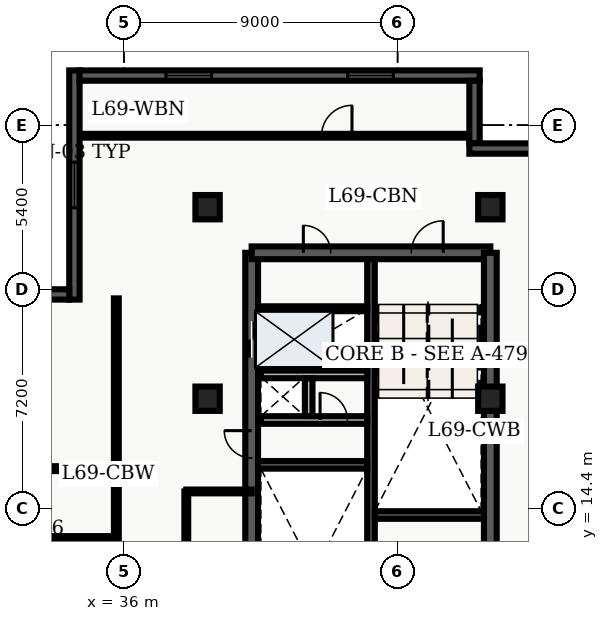
"""IFC4 building model, lengths in metres.
Left out: names, types, materials, properties, quantities, classifications, styles, units other than length and angle.
Written with IfcOpenShell. Run it as: python <this file> out.ifc"""

import sys

from ifc_helpers import new_model, entity, si_unit, converted_unit, direction, frame, origin_with_axes, origin_2d_with_axis, place, context, subcontext, project, spatial, polyline, rectangle, outline, extrude, element, fill, save


model = new_model("IFC4")
c1 = context("Model", 3, precision=1e-05, world=origin_with_axes(), true_north=direction((0.0, 1.0)))
c2 = subcontext(c1, "Body", "Model", "MODEL_VIEW")
j1 = project(units=[si_unit("LENGTHUNIT", "METRE"), converted_unit("PLANEANGLEUNIT", "DEGREE", entity("IfcPlaneAngleMeasure", 0.017), si_unit("PLANEANGLEUNIT", "RADIAN"), dimensions=[0, 0, 0, 0, 0, 0, 0])], contexts=[c1])
p1 = place(None, origin_with_axes())
s1 = spatial("IfcSite", under=j1, at=p1, CompositionType="ELEMENT")
p2 = place(p1, origin_with_axes())
s2 = spatial("IfcBuilding", under=s1, at=p2, CompositionType="ELEMENT")
p3 = place(p2, frame((0.0, 0.0, 280.2), z_axis=(0.0, 0.0, 1.0), x_axis=(1.0, 0.0, 0.0)))
s3 = spatial("IfcBuildingStorey", under=s2, at=p3, CompositionType="ELEMENT", Elevation=280.2)
p4 = place(p3, frame((40.2, 7.2, 0.0), z_axis=(0.0, 0.0, 1.0), x_axis=(0.0, 1.0, 0.0)))
e1 = element("IfcWall", 1, at=p4, inside=s3, PredefinedType="SHEAR", context=c2, shape_type="SweptSolid", body=[
    extrude(outline(polyline([(0.0, -0.21), (15.6, -0.21), (15.6, 0.21), (0.0, 0.21), (0.0, -0.21)])), origin_with_axes(), (0.0, 0.0, 1.0), 3.66),
])
p5 = place(p4, frame((12.75, 0.0, 0.0), z_axis=(0.0, 0.0, 1.0), x_axis=(1.0, 0.0, 0.0)))
e2 = element("IfcOpeningElement", 2, at=p5, cuts=e1, PredefinedType="OPENING", context=c2, shape_type="SweptSolid", body=[
    extrude(rectangle(XDim=1.2, YDim=0.44, at=origin_2d_with_axis()), origin_with_axes(), (0.0, 0.0, 1.0), 2.15),
])
p6 = place(p4, frame((9.3, 0.0, 0.0), z_axis=(0.0, 0.0, 1.0), x_axis=(1.0, 0.0, 0.0)))
e3 = element("IfcOpeningElement", 3, at=p6, cuts=e1, PredefinedType="OPENING", context=c2, shape_type="SweptSolid", body=[
    extrude(rectangle(XDim=0.9, YDim=0.44, at=origin_2d_with_axis()), origin_with_axes(), (0.0, 0.0, 1.0), 2.15),
])
p7 = place(p3, frame((40.2, 22.8, 0.0), z_axis=(0.0, 0.0, 1.0), x_axis=(1.0, 0.0, 0.0)))
e4 = element("IfcWall", 4, at=p7, inside=s3, PredefinedType="SHEAR", context=c2, shape_type="SweptSolid", body=[
    extrude(outline(polyline([(0.0, -0.21), (7.85, -0.21), (7.85, 0.21), (0.0, 0.21), (0.0, -0.21)])), origin_with_axes(), (0.0, 0.0, 1.0), 3.66),
])
p8 = place(p7, frame((5.775, 0.0, 0.0), z_axis=(0.0, 0.0, 1.0), x_axis=(1.0, 0.0, 0.0)))
e5 = element("IfcOpeningElement", 5, at=p8, cuts=e4, PredefinedType="OPENING", context=c2, shape_type="SweptSolid", body=[
    extrude(rectangle(XDim=1.05, YDim=0.44, at=origin_2d_with_axis()), origin_with_axes(), (0.0, 0.0, 1.0), 2.15),
])
p9 = place(p7, frame((2.15, 0.0, 0.0), z_axis=(0.0, 0.0, 1.0), x_axis=(1.0, 0.0, 0.0)))
e6 = element("IfcOpeningElement", 6, at=p9, cuts=e4, PredefinedType="OPENING", context=c2, shape_type="SweptSolid", body=[
    extrude(rectangle(XDim=0.9, YDim=0.44, at=origin_2d_with_axis()), origin_with_axes(), (0.0, 0.0, 1.0), 2.15),
])
p10 = place(p3, frame((48.05, 7.2, 0.0), z_axis=(0.0, 0.0, 1.0), x_axis=(0.0, 1.0, 0.0)))
e7 = element("IfcWall", 7, at=p10, inside=s3, PredefinedType="SHEAR", context=c2, shape_type="SweptSolid", body=[
    extrude(outline(polyline([(0.0, -0.21), (15.6, -0.21), (15.6, 0.21), (0.0, 0.21), (0.0, -0.21)])), origin_with_axes(), (0.0, 0.0, 1.0), 3.66),
])
p11 = place(p10, frame((1.375, 0.0, 0.0), z_axis=(0.0, 0.0, 1.0), x_axis=(1.0, 0.0, 0.0)))
e8 = element("IfcOpeningElement", 8, at=p11, cuts=e7, PredefinedType="OPENING", context=c2, shape_type="SweptSolid", body=[
    extrude(rectangle(XDim=1.05, YDim=0.44, at=origin_2d_with_axis()), origin_with_axes(), (0.0, 0.0, 1.0), 2.15),
])
p12 = place(p10, frame((5.125, 0.0, 0.0), z_axis=(0.0, 0.0, 1.0), x_axis=(1.0, 0.0, 0.0)))
e9 = element("IfcOpeningElement", 9, at=p12, cuts=e7, PredefinedType="OPENING", context=c2, shape_type="SweptSolid", body=[
    extrude(rectangle(XDim=0.95, YDim=0.44, at=origin_2d_with_axis()), origin_with_axes(), (0.0, 0.0, 1.0), 2.15),
])
p13 = place(p3, frame((44.125, 7.41, 0.0), z_axis=(0.0, 0.0, 1.0), x_axis=(0.0, 1.0, 0.0)))
e10 = element("IfcWall", 10, at=p13, inside=s3, PredefinedType="SHEAR", context=c2, shape_type="SweptSolid", body=[
    extrude(outline(polyline([(0.0, -0.125), (15.18, -0.125), (15.18, 0.125), (0.0, 0.125), (0.0, -0.125)])), origin_with_axes(), (0.0, 0.0, 1.0), 3.66),
])
for number, where, z_axis, x_axis in (
    (11, (40.41, 15.825, 0.0), (0.0, 0.0, 1.0), (1.0, 0.0, 0.0)),
    (12, (44.25, 14.175, 0.0), (0.0, 0.0, 1.0), (1.0, 0.0, 0.0)),
):
    element("IfcWall", number, at=place(p3, frame(where, z_axis=z_axis, x_axis=x_axis)), inside=s3, PredefinedType="SHEAR", context=c2, shape_type="SweptSolid", body=[
        extrude(outline(polyline([(0.0, -0.125), (3.59, -0.125), (3.59, 0.125), (0.0, 0.125), (0.0, -0.125)])), origin_with_axes(), (0.0, 0.0, 1.0), 3.66),
    ])
p14 = place(p3, frame((40.5, 17.3, 0.0), z_axis=(0.0, 0.0, 1.0), x_axis=(1.0, 0.0, 0.0)))
e13 = element("IfcWall", 13, at=p14, inside=s3, PredefinedType="SOLIDWALL", context=c2, shape_type="SweptSolid", body=[
    extrude(outline(polyline([(0.0, -0.125), (3.5, -0.125), (3.5, 0.125), (0.0, 0.125), (0.0, -0.125)])), origin_with_axes(), (0.0, 0.0, 1.0), 2.7),
])
p15 = place(p14, frame((2.4, 0.0, 0.0), z_axis=(0.0, 0.0, 1.0), x_axis=(1.0, 0.0, 0.0)))
e14 = element("IfcOpeningElement", 14, at=p15, cuts=e13, PredefinedType="OPENING", context=c2, shape_type="SweptSolid", body=[
    extrude(rectangle(XDim=0.9, YDim=0.27, at=origin_2d_with_axis()), origin_with_axes(), (0.0, 0.0, 1.0), 2.15),
])
p16 = place(p3, frame((40.5, 18.8, 0.0), z_axis=(0.0, 0.0, 1.0), x_axis=(1.0, 0.0, 0.0)))
e15 = element("IfcWall", 15, at=p16, inside=s3, PredefinedType="SOLIDWALL", context=c2, shape_type="SweptSolid", body=[
    extrude(outline(polyline([(0.0, -0.125), (3.5, -0.125), (3.5, 0.125), (0.0, 0.125), (0.0, -0.125)])), origin_with_axes(), (0.0, 0.0, 1.0), 2.7),
])
p17 = place(p3, frame((42.075, 17.43, 0.0), z_axis=(0.0, 0.0, 1.0), x_axis=(0.0, 1.0, 0.0)))
e16 = element("IfcWall", 16, at=p17, inside=s3, PredefinedType="SOLIDWALL", context=c2, shape_type="SweptSolid", body=[
    extrude(outline(polyline([(0.0, -0.125), (1.24, -0.125), (1.24, 0.125), (0.0, 0.125), (0.0, -0.125)])), origin_with_axes(), (0.0, 0.0, 1.0), 2.7),
])
for number, where, z_axis, x_axis in (
    (17, (38.75, 18.0, 0.0), (0.0, 0.0, 1.0), (1.0, 0.0, 0.0)),
    (18, (38.75, 24.3, 0.0), (0.0, 0.0, 1.0), (1.0, 0.0, 0.0)),
    (19, (48.05, 18.0, 0.0), (0.0, 0.0, 1.0), (1.0, 0.0, 0.0)),
    (20, (48.05, 24.3, 0.0), (0.0, 0.0, 1.0), (1.0, 0.0, 0.0)),
):
    element("IfcColumn", number, at=place(p3, frame(where, z_axis=z_axis, x_axis=x_axis)), inside=s3, PredefinedType="COLUMN", context=c2, shape_type="SweptSolid", body=[
        extrude(rectangle(XDim=0.8, YDim=0.8, at=origin_2d_with_axis()), origin_with_axes(), (0.0, 0.0, 1.0), 3.9),
    ])
p18 = place(p3, frame((40.5, 20.96, 0.0), z_axis=(0.0, 0.0, 1.0), x_axis=(1.0, 0.0, 0.0)))
e21 = element("IfcWall", 21, at=p18, inside=s3, PredefinedType="PARTITIONING", context=c2, shape_type="SweptSolid", body=[
    extrude(outline(polyline([(0.0, -0.08), (3.5, -0.08), (3.5, 0.08), (0.0, 0.08), (0.0, -0.08)])), origin_with_axes(), (0.0, 0.0, 1.0), 2.7),
])
p19 = place(p3, frame((20.3, 13.4, 0.0), z_axis=(0.0, 0.0, 1.0), x_axis=(1.0, 0.0, 0.0)))
e22 = element("IfcWall", 22, at=p19, inside=s3, PredefinedType="PARTITIONING", context=c2, shape_type="SweptSolid", body=[
    extrude(outline(polyline([(0.0, -0.08), (15.45, -0.08), (15.45, 0.08), (0.0, 0.08), (0.0, -0.08)])), origin_with_axes(), (0.0, 0.0, 1.0), 2.7),
])
p20 = place(p19, frame((2.304, 0.0, 0.0), z_axis=(0.0, 0.0, 1.0), x_axis=(1.0, 0.0, 0.0)))
e23 = element("IfcOpeningElement", 23, at=p20, cuts=e22, PredefinedType="OPENING", context=c2, shape_type="SweptSolid", body=[
    extrude(rectangle(XDim=1.0, YDim=0.18, at=origin_2d_with_axis()), origin_with_axes(), (0.0, 0.0, 1.0), 2.15),
])
p21 = place(p19, frame((6.866, 0.0, 0.0), z_axis=(0.0, 0.0, 1.0), x_axis=(1.0, 0.0, 0.0)))
e24 = element("IfcOpeningElement", 24, at=p21, cuts=e22, PredefinedType="OPENING", context=c2, shape_type="SweptSolid", body=[
    extrude(rectangle(XDim=1.0, YDim=0.18, at=origin_2d_with_axis()), origin_with_axes(), (0.0, 0.0, 1.0), 2.15),
])
p22 = place(p19, frame((12.337, 0.0, 0.0), z_axis=(0.0, 0.0, 1.0), x_axis=(1.0, 0.0, 0.0)))
e25 = element("IfcOpeningElement", 25, at=p22, cuts=e22, PredefinedType="OPENING", context=c2, shape_type="SweptSolid", body=[
    extrude(rectangle(XDim=1.2, YDim=0.18, at=origin_2d_with_axis()), origin_with_axes(), (0.0, 0.0, 1.0), 2.2),
])
p23 = place(p3, frame((20.3, 15.7, 0.0), z_axis=(0.0, 0.0, 1.0), x_axis=(1.0, 0.0, 0.0)))
e26 = element("IfcWall", 26, at=p23, inside=s3, PredefinedType="PARTITIONING", context=c2, shape_type="SweptSolid", body=[
    extrude(outline(polyline([(0.0, -0.08), (15.45, -0.08), (15.45, 0.08), (0.0, 0.08), (0.0, -0.08)])), origin_with_axes(), (0.0, 0.0, 1.0), 2.7),
])
p24 = place(p23, frame((7.775, 0.0, 0.0), z_axis=(0.0, 0.0, 1.0), x_axis=(1.0, 0.0, 0.0)))
e27 = element("IfcOpeningElement", 27, at=p24, cuts=e26, PredefinedType="OPENING", context=c2, shape_type="SweptSolid", body=[
    extrude(rectangle(XDim=1.0, YDim=0.18, at=origin_2d_with_axis()), origin_with_axes(), (0.0, 0.0, 1.0), 2.15),
])
p25 = place(p3, frame((35.75, 4.35, 0.0), z_axis=(0.0, 0.0, 1.0), x_axis=(0.0, 1.0, 0.0)))
e28 = element("IfcWall", 28, at=p25, inside=s3, PredefinedType="PARTITIONING", context=c2, shape_type="SweptSolid", body=[
    extrude(outline(polyline([(0.0, -0.08), (16.95, -0.08), (16.95, 0.08), (0.0, 0.08), (0.0, -0.08)])), origin_with_axes(), (0.0, 0.0, 1.0), 2.7),
])
p26 = place(p3, frame((34.535, 26.65, 0.0), z_axis=(0.0, 0.0, 1.0), x_axis=(1.0, 0.0, 0.0)))
e29 = element("IfcWall", 29, at=p26, inside=s3, PredefinedType="PARTITIONING", context=c2, shape_type="SweptSolid", body=[
    extrude(outline(polyline([(0.0, -0.062), (12.995, -0.062), (12.995, 0.062), (0.0, 0.062), (0.0, -0.062)])), origin_with_axes(), (0.0, 0.0, 1.0), 2.7),
])
p27 = place(p26, frame((8.465, 0.0, 0.0), z_axis=(0.0, 0.0, 1.0), x_axis=(1.0, 0.0, 0.0)))
e30 = element("IfcOpeningElement", 30, at=p27, cuts=e29, PredefinedType="OPENING", context=c2, shape_type="SweptSolid", body=[
    extrude(rectangle(XDim=1.0, YDim=0.145, at=origin_2d_with_axis()), origin_with_axes(), (0.0, 0.0, 1.0), 2.15),
])
p28 = place(p3, frame((38.05, 14.95, 0.0), z_axis=(0.0, 0.0, 1.0), x_axis=(1.0, 0.0, 0.0)))
e31 = element("IfcWall", 31, at=p28, inside=s3, PredefinedType="PARTITIONING", context=c2, shape_type="SweptSolid", body=[
    extrude(outline(polyline([(0.0, -0.062), (2.15, -0.062), (2.15, 0.062), (0.0, 0.062), (0.0, -0.062)])), origin_with_axes(), (0.0, 0.0, 1.0), 2.7),
])
p29 = place(p3, frame((38.05, 7.0, 0.0), z_axis=(0.0, 0.0, 1.0), x_axis=(0.0, 1.0, 0.0)))
e32 = element("IfcWall", 32, at=p29, inside=s3, PredefinedType="PARTITIONING", context=c2, shape_type="SweptSolid", body=[
    extrude(outline(polyline([(0.0, -0.062), (7.95, -0.062), (7.95, 0.062), (0.0, 0.062), (0.0, -0.062)])), origin_with_axes(), (0.0, 0.0, 1.0), 2.7),
])
p30 = place(p29, frame((5.65, 0.0, 0.0), z_axis=(0.0, 0.0, 1.0), x_axis=(1.0, 0.0, 0.0)))
e33 = element("IfcOpeningElement", 33, at=p30, cuts=e32, PredefinedType="OPENING", context=c2, shape_type="SweptSolid", body=[
    extrude(rectangle(XDim=0.9, YDim=0.145, at=origin_2d_with_axis()), origin_with_axes(), (0.0, 0.0, 1.0), 2.15),
])
p31 = place(p3, frame((34.37, 21.26, 0.0), z_axis=(0.0, 0.0, 1.0), x_axis=(0.0, 1.0, 0.0)))
e34 = element("IfcWall", 34, at=p31, inside=s3, PredefinedType="SOLIDWALL", context=c2, shape_type="SweptSolid", body=[
    extrude(outline(polyline([(0.0, -0.17), (7.54, -0.17), (7.54, 0.17), (0.0, 0.17), (0.0, -0.17)])), origin_with_axes(), (0.0, 0.0, 1.0), 3.66),
])
p32 = place(p31, frame((3.77, 0.0, 0.45), z_axis=(0.0, 0.0, 1.0), x_axis=(1.0, 0.0, 0.0)))
e35 = element("IfcOpeningElement", 35, at=p32, cuts=e34, PredefinedType="OPENING", context=c2, shape_type="SweptSolid", body=[
    extrude(rectangle(XDim=1.5, YDim=0.36, at=origin_2d_with_axis()), origin_with_axes(), (0.0, 0.0, 1.0), 2.1),
])
p33 = place(p3, frame((34.54, 28.63, 0.0), z_axis=(0.0, 0.0, 1.0), x_axis=(1.0, 0.0, 0.0)))
e36 = element("IfcWall", 36, at=p33, inside=s3, PredefinedType="SOLIDWALL", context=c2, shape_type="SweptSolid", body=[
    extrude(outline(polyline([(0.0, -0.17), (13.16, -0.17), (13.16, 0.17), (0.0, 0.17), (0.0, -0.17)])), origin_with_axes(), (0.0, 0.0, 1.0), 3.66),
])
p34 = place(p33, frame((3.59, 0.0, 0.45), z_axis=(0.0, 0.0, 1.0), x_axis=(1.0, 0.0, 0.0)))
e37 = element("IfcOpeningElement", 37, at=p34, cuts=e36, PredefinedType="OPENING", context=c2, shape_type="SweptSolid", body=[
    extrude(rectangle(XDim=1.5, YDim=0.36, at=origin_2d_with_axis()), origin_with_axes(), (0.0, 0.0, 1.0), 2.1),
])
p35 = place(p33, frame((9.57, 0.0, 0.45), z_axis=(0.0, 0.0, 1.0), x_axis=(1.0, 0.0, 0.0)))
e38 = element("IfcOpeningElement", 38, at=p35, cuts=e36, PredefinedType="OPENING", context=c2, shape_type="SweptSolid", body=[
    extrude(rectangle(XDim=1.5, YDim=0.36, at=origin_2d_with_axis()), origin_with_axes(), (0.0, 0.0, 1.0), 2.1),
])
p36 = place(p3, frame((47.53, 28.46, 0.0), z_axis=(0.0, 0.0, 1.0), x_axis=(0.0, -1.0, 0.0)))
e39 = element("IfcWall", 39, at=p36, inside=s3, PredefinedType="SOLIDWALL", context=c2, shape_type="SweptSolid", body=[
    extrude(outline(polyline([(0.0, -0.17), (2.06, -0.17), (2.06, 0.17), (0.0, 0.17), (0.0, -0.17)])), origin_with_axes(), (0.0, 0.0, 1.0), 3.66),
])
p37 = place(p3, frame((47.36, 26.23, 0.0), z_axis=(0.0, 0.0, 1.0), x_axis=(1.0, 0.0, 0.0)))
e40 = element("IfcWall", 40, at=p37, inside=s3, PredefinedType="SOLIDWALL", context=c2, shape_type="SweptSolid", body=[
    extrude(outline(polyline([(0.0, -0.17), (2.74, -0.17), (2.74, 0.17), (0.0, 0.17), (0.0, -0.17)])), origin_with_axes(), (0.0, 0.0, 1.0), 3.66),
])
p38 = place(p3, frame((32.06, 21.43, 0.0), z_axis=(0.0, 0.0, 1.0), x_axis=(1.0, 0.0, 0.0)))
e41 = element("IfcWall", 41, at=p38, inside=s3, PredefinedType="SOLIDWALL", context=c2, shape_type="SweptSolid", body=[
    extrude(outline(polyline([(0.0, -0.17), (2.14, -0.17), (2.14, 0.17), (0.0, 0.17), (0.0, -0.17)])), origin_with_axes(), (0.0, 0.0, 1.0), 3.66),
])
p39 = place(p4, frame((12.75, 0.0, 0.0), z_axis=(0.0, 0.0, 1.0), x_axis=(1.0, 0.0, 0.0)))
e42 = element("IfcDoor", 42, at=p39, inside=s3, OperationType="DOUBLE_DOOR_SLIDING", PredefinedType="DOOR", context=c2, shape_type="SweptSolid", body=[
    extrude(rectangle(XDim=1.2, YDim=0.09, at=origin_2d_with_axis()), origin_with_axes(), (0.0, 0.0, 1.0), 2.15),
])
fill(e2, e42)
p40 = place(p4, frame((9.3, 0.0, 0.0), z_axis=(0.0, 0.0, 1.0), x_axis=(1.0, 0.0, 0.0)))
e43 = element("IfcDoor", 43, at=p40, inside=s3, OperationType="SINGLE_SWING_RIGHT", PredefinedType="DOOR", context=c2, shape_type="SweptSolid", body=[
    extrude(rectangle(XDim=0.9, YDim=0.09, at=origin_2d_with_axis()), origin_with_axes(), (0.0, 0.0, 1.0), 2.15),
])
fill(e3, e43)
p41 = place(p14, frame((2.4, 0.0, 0.0), z_axis=(0.0, 0.0, 1.0), x_axis=(1.0, 0.0, 0.0)))
e44 = element("IfcDoor", 44, at=p41, inside=s3, OperationType="SINGLE_SWING_LEFT", PredefinedType="DOOR", context=c2, shape_type="SweptSolid", body=[
    extrude(rectangle(XDim=0.9, YDim=0.09, at=origin_2d_with_axis()), origin_with_axes(), (0.0, 0.0, 1.0), 2.15),
])
fill(e14, e44)
p42 = place(p7, frame((5.775, 0.0, 0.0), z_axis=(0.0, 0.0, 1.0), x_axis=(1.0, 0.0, 0.0)))
e45 = element("IfcDoor", 45, at=p42, inside=s3, OperationType="SINGLE_SWING_RIGHT", PredefinedType="DOOR", context=c2, shape_type="SweptSolid", body=[
    extrude(rectangle(XDim=1.05, YDim=0.09, at=origin_2d_with_axis()), origin_with_axes(), (0.0, 0.0, 1.0), 2.15),
])
fill(e5, e45)
p43 = place(p7, frame((2.15, 0.0, 0.0), z_axis=(0.0, 0.0, 1.0), x_axis=(1.0, 0.0, 0.0)))
e46 = element("IfcDoor", 46, at=p43, inside=s3, OperationType="SINGLE_SWING_LEFT", PredefinedType="DOOR", context=c2, shape_type="SweptSolid", body=[
    extrude(rectangle(XDim=0.9, YDim=0.09, at=origin_2d_with_axis()), origin_with_axes(), (0.0, 0.0, 1.0), 2.15),
])
fill(e6, e46)
p44 = place(p26, frame((8.465, 0.0, 0.0), z_axis=(0.0, 0.0, 1.0), x_axis=(1.0, 0.0, 0.0)))
e47 = element("IfcDoor", 47, at=p44, inside=s3, OperationType="SINGLE_SWING_RIGHT", PredefinedType="DOOR", context=c2, shape_type="SweptSolid", body=[
    extrude(rectangle(XDim=1.0, YDim=0.075, at=origin_2d_with_axis()), origin_with_axes(), (0.0, 0.0, 1.0), 2.15),
])
fill(e30, e47)
p45 = place(p31, frame((3.77, 0.0, 0.45), z_axis=(0.0, 0.0, 1.0), x_axis=(1.0, 0.0, 0.0)))
e48 = element("IfcWindow", 48, at=p45, inside=s3, PredefinedType="WINDOW", context=c2, shape_type="SweptSolid", body=[
    extrude(rectangle(XDim=1.5, YDim=0.09, at=origin_2d_with_axis()), origin_with_axes(), (0.0, 0.0, 1.0), 2.1),
])
fill(e35, e48)
p46 = place(p33, frame((3.59, 0.0, 0.45), z_axis=(0.0, 0.0, 1.0), x_axis=(1.0, 0.0, 0.0)))
e49 = element("IfcWindow", 49, at=p46, inside=s3, PredefinedType="WINDOW", context=c2, shape_type="SweptSolid", body=[
    extrude(rectangle(XDim=1.5, YDim=0.09, at=origin_2d_with_axis()), origin_with_axes(), (0.0, 0.0, 1.0), 2.1),
])
fill(e37, e49)
p47 = place(p33, frame((9.57, 0.0, 0.45), z_axis=(0.0, 0.0, 1.0), x_axis=(1.0, 0.0, 0.0)))
e50 = element("IfcWindow", 50, at=p47, inside=s3, PredefinedType="WINDOW", context=c2, shape_type="SweptSolid", body=[
    extrude(rectangle(XDim=1.5, YDim=0.09, at=origin_2d_with_axis()), origin_with_axes(), (0.0, 0.0, 1.0), 2.1),
])
fill(e38, e50)
save(model, sys.argv[1])
